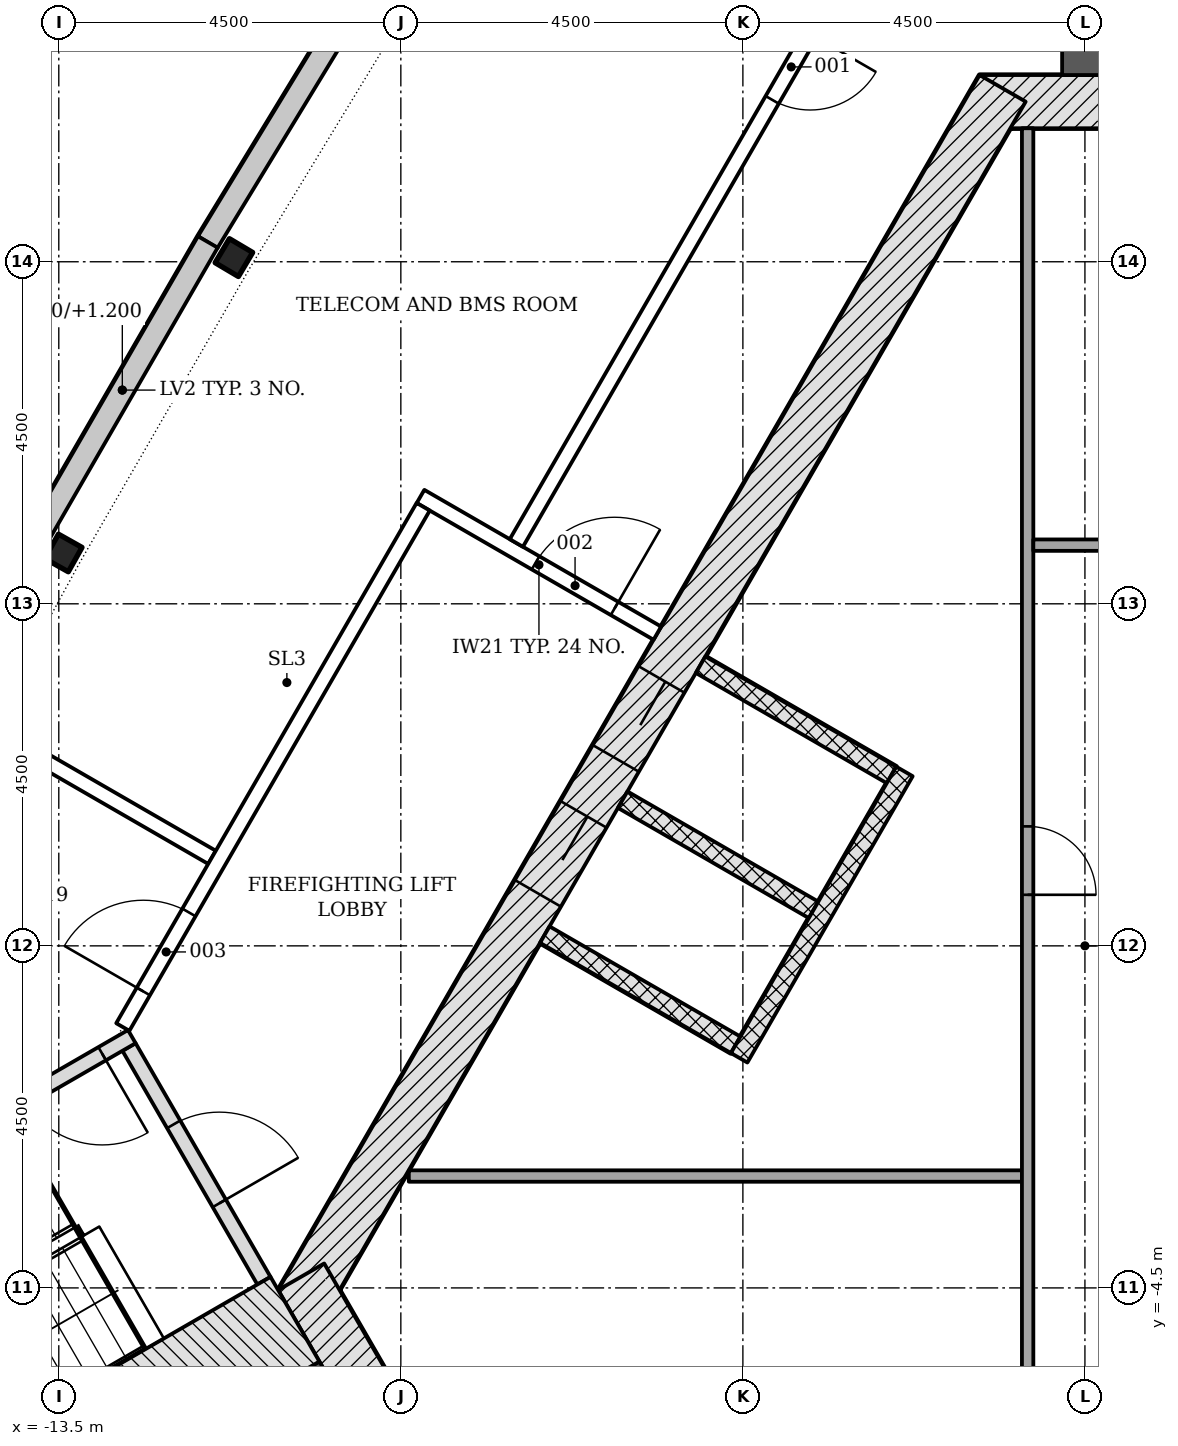
"""IFC4 building model, lengths in metres.
Left out: names, types, materials, properties, quantities, classifications, styles, units other than length and angle.
Written with IfcOpenShell. Run it as: python <this file> out.ifc"""

import sys

from ifc_helpers import new_model, si_unit, direction, frame, frame_2d, origin, origin_2d, place, context, subcontext, project, spatial, polyline, rectangle, i_section, outline, extrude, element, fill, save


model = new_model("IFC4")
c1 = context("Model", 3, precision=1e-05, world=origin(), true_north=direction((0.0, 1.0)))
c2 = subcontext(c1, "Body", "Model", "MODEL_VIEW")
j1 = project(units=[si_unit("LENGTHUNIT", "METRE"), si_unit("PLANEANGLEUNIT", "RADIAN")], contexts=[c1])
p1 = place(None, origin())
s1 = spatial("IfcSite", under=j1, at=p1, CompositionType="ELEMENT")
p2 = place(p1, origin())
s2 = spatial("IfcBuilding", under=s1, at=p2, CompositionType="ELEMENT")
p3 = place(p2, frame((0.0, 0.0, 293.1)))
s3 = spatial("IfcBuildingStorey", under=s2, at=p3, CompositionType="ELEMENT", Elevation=293.1)
p4 = place(p3, frame((1.386, 11.106, -0.25), z_axis=(0.0, 0.0, 1.0), x_axis=(-1.0, 0.0, 0.0)))
e1 = element("IfcWall", 1, at=p4, inside=s3, PredefinedType="SHEAR", context=c2, shape_type="SweptSolid", body=[
    extrude(rectangle(XDim=2.771, YDim=0.7, at=frame_2d((1.386, 0.0))), origin(), (0.0, 0.0, 1.0), 4.5),
])
p5 = place(p3, frame((-1.083, 11.281, -0.25), z_axis=(0.0, 0.0, 1.0), x_axis=(-0.500001446645, -0.866024568562, 0.0)))
e2 = element("IfcWall", 2, at=p5, inside=s3, PredefinedType="SHEAR", context=c2, shape_type="SweptSolid", body=[
    extrude(rectangle(XDim=18.458, YDim=0.7, at=frame_2d((9.229, 0.0))), origin(), (0.0, 0.0, 1.0), 4.5),
])
p6 = place(p5, frame((8.979, 0.0, 0.25)))
e3 = element("IfcOpeningElement", 3, at=p6, cuts=e2, PredefinedType="OPENING", context=c2, shape_type="SweptSolid", body=[
    extrude(rectangle(XDim=1.2, YDim=2.1, at=frame_2d((0.6, 1.05))), frame((0.0, 0.36, 0.0), z_axis=(0.0, -1.0, 0.0), x_axis=(1.0, 0.0, 0.0)), (0.0, 0.0, 1.0), 0.72),
])
p7 = place(p5, frame((11.029, 0.0, 0.25)))
e4 = element("IfcOpeningElement", 4, at=p7, cuts=e2, PredefinedType="OPENING", context=c2, shape_type="SweptSolid", body=[
    extrude(rectangle(XDim=1.2, YDim=2.1, at=frame_2d((0.6, 1.05))), frame((0.0, 0.36, 0.0), z_axis=(0.0, -1.0, 0.0), x_axis=(1.0, 0.0, 0.0)), (0.0, 0.0, 1.0), 0.72),
])
p8 = place(p3, frame((-10.311, -4.353, -0.25), z_axis=(0.0, 0.0, 1.0), x_axis=(0.500042739161, -0.866000726912, 0.0)))
e5 = element("IfcWall", 5, at=p8, inside=s3, PredefinedType="SHEAR", context=c2, shape_type="SweptSolid", body=[
    extrude(rectangle(XDim=2.771, YDim=0.7, at=frame_2d((1.386, 0.0))), origin(), (0.0, 0.0, 1.0), 4.5),
])
p9 = place(p3, frame((0.0, 11.456, -0.25), z_axis=(0.0, 0.0, 1.0), x_axis=(0.0, 1.0, 0.0)))
e6 = element("IfcWall", 6, at=p9, inside=s3, PredefinedType="SHEAR", context=c2, shape_type="SweptSolid", body=[
    extrude(rectangle(XDim=6.679, YDim=0.6, at=frame_2d((3.339, 0.0))), origin(), (0.0, 0.0, 1.0), 4.5),
])
p10 = place(p3, frame((-9.922, -5.728, -0.25), z_axis=(0.0, 0.0, 1.0), x_axis=(-0.866032176823, -0.499988268569, 0.0)))
e7 = element("IfcWall", 7, at=p10, inside=s3, PredefinedType="SHEAR", context=c2, shape_type="SweptSolid", body=[
    extrude(rectangle(XDim=6.678, YDim=0.6, at=frame_2d((3.339, 0.0))), origin(), (0.0, 0.0, 1.0), 4.5),
])
for number, where, z_axis, x_axis in (
    (8, (-11.196, 9.055, -0.25), (0.0, 0.0, 1.0), (-0.51, -0.86, 0.0)),
    (9, (-13.44, 5.169, -0.25), (0.0, 0.0, 1.0), (-0.49, -0.872, 0.0)),
):
    element("IfcColumn", number, at=place(p3, frame(where, z_axis=z_axis, x_axis=x_axis)), inside=s3, PredefinedType="COLUMN", context=c2, shape_type="SweptSolid", body=[
        extrude(i_section(OverallWidth=0.368, OverallDepth=0.356, WebThickness=0.011, FlangeThickness=0.018, FilletRadius=0.015, at=origin_2d()), origin(), (0.0, 0.0, 1.0), 4.5),
    ])
p11 = place(p3, origin())
e10 = element("IfcWall", 10, at=p11, inside=s3, PredefinedType="NOTDEFINED", context=c2, shape_type="SweptSolid", body=[
    extrude(outline(polyline([(-6.901, 16.968), (-9.33, 13.179), (-11.669, 9.335), (-11.413, 9.179), (-9.075, 13.02), (-6.649, 16.806), (-6.901, 16.968)])), origin(), (0.0, 0.0, 1.0), 4.25),
])
p12 = place(p3, origin())
e11 = element("IfcWall", 11, at=p12, inside=s3, PredefinedType="NOTDEFINED", context=c2, shape_type="SweptSolid", body=[
    extrude(outline(polyline([(-11.669, 9.335), (-13.919, 5.438), (-13.659, 5.288), (-11.409, 9.185), (-11.669, 9.335)])), origin(), (0.0, 0.0, 1.0), 1.2),
])
p13 = place(p3, origin())
e12 = element("IfcWall", 12, at=p13, inside=s3, PredefinedType="NOTDEFINED", context=c2, shape_type="SweptSolid", body=[
    extrude(outline(polyline([(-18.145, -2.507), (-19.021, -4.273), (-19.538, -5.703), (-19.733, -7.21), (-19.599, -8.724), (-19.141, -10.174), (-18.381, -11.49), (-17.355, -12.611), (-16.111, -13.485), (-14.708, -14.069), (-13.211, -14.336), (-11.244, -14.46), (-11.225, -14.161), (-13.176, -14.038), (-14.623, -13.779), (-15.965, -13.22), (-17.156, -12.385), (-18.138, -11.312), (-18.865, -10.052), (-19.303, -8.665), (-19.432, -7.216), (-19.244, -5.774), (-18.745, -4.391), (-17.876, -2.64), (-18.145, -2.507)])), origin(), (0.0, 0.0, 1.0), 4.25),
])
for number, where, z_axis, x_axis in (
    (13, (-5.056, 3.699, -0.25), (0.0, 0.0, 1.0), (0.866, -0.5, 0.0)),
    (14, (-6.081, 1.923, -0.25), (0.0, 0.0, 1.0), (0.866, -0.5, 0.0)),
    (15, (-7.106, 0.148, -0.25), (0.0, 0.0, 1.0), (0.866, -0.5, 0.0)),
):
    element("IfcWall", number, at=place(p3, frame(where, z_axis=z_axis, x_axis=x_axis)), inside=s3, PredefinedType="PARTITIONING", context=c2, shape_type="SweptSolid", body=[
        extrude(rectangle(XDim=2.9, YDim=0.25, at=frame_2d((1.45, 0.0))), origin(), (0.0, 0.0, 1.0), 4.5),
    ])
p14 = place(p3, frame((-2.374, 2.294, 0.0), z_axis=(0.0, 0.0, 1.0), x_axis=(-0.499996127374, -0.866027639635, 0.0)))
e16 = element("IfcWall", 16, at=p14, inside=s3, PredefinedType="PARTITIONING", context=c2, shape_type="SweptSolid", body=[
    extrude(rectangle(XDim=4.35, YDim=0.25, at=frame_2d((2.175, 0.0))), origin(), (0.0, 0.0, 1.0), 4.25),
])
p15 = place(p3, frame((-8.895, -3.028, 0.0), z_axis=(0.0, 0.0, 1.0), x_axis=(1.0, 0.0, 0.0)))
e17 = element("IfcWall", 17, at=p15, inside=s3, PredefinedType="PARTITIONING", context=c2, shape_type="SweptSolid", body=[
    extrude(rectangle(XDim=8.066, YDim=0.15, at=frame_2d((4.033, 0.0))), origin(), (0.0, 0.0, 1.0), 4.25),
])
p16 = place(p3, frame((-0.754, 10.756, 0.0), z_axis=(0.0, 0.0, 1.0), x_axis=(0.0, -1.0, 0.0)))
e18 = element("IfcWall", 18, at=p16, inside=s3, PredefinedType="PARTITIONING", context=c2, shape_type="SweptSolid", body=[
    extrude(rectangle(XDim=16.985, YDim=0.15, at=frame_2d((8.492, 0.0))), origin(), (0.0, 0.0, 1.0), 4.25),
])
p17 = place(p16, frame((9.185, 0.0, 0.0)))
e19 = element("IfcOpeningElement", 19, at=p17, cuts=e18, PredefinedType="OPENING", context=c2, shape_type="SweptSolid", body=[
    extrude(rectangle(XDim=0.9, YDim=2.1, at=frame_2d((0.45, 1.05))), frame((0.0, 0.085, 0.0), z_axis=(0.0, -1.0, 0.0), x_axis=(1.0, 0.0, 0.0)), (0.0, 0.0, 1.0), 0.17),
])
p18 = place(p3, frame((-0.679, 5.272, 0.0), z_axis=(0.0, 0.0, 1.0), x_axis=(1.0, 0.0, 0.0)))
e20 = element("IfcWall", 20, at=p18, inside=s3, PredefinedType="PARTITIONING", context=c2, shape_type="SweptSolid", body=[
    extrude(rectangle(XDim=1.375, YDim=0.15, at=frame_2d((0.688, 0.0))), origin(), (0.0, 0.0, 1.0), 4.25),
])
p19 = place(p3, frame((-12.576, -1.331, -0.25), z_axis=(0.0, 0.0, 1.0), x_axis=(0.499970499736, -0.8660424351, 0.0)))
e21 = element("IfcWall", 21, at=p19, inside=s3, PredefinedType="SHEAR", context=c2, shape_type="SweptSolid", body=[
    extrude(rectangle(XDim=3.55, YDim=0.2, at=frame_2d((1.775, 0.0))), origin(), (0.0, 0.0, 1.0), 4.5),
])
p20 = place(p19, frame((1.175, 0.0, 0.25)))
e22 = element("IfcOpeningElement", 22, at=p20, cuts=e21, PredefinedType="OPENING", context=c2, shape_type="SweptSolid", body=[
    extrude(rectangle(XDim=1.2, YDim=2.1, at=frame_2d((0.6, 1.05))), frame((0.0, 0.11, 0.0), z_axis=(0.0, -1.0, 0.0), x_axis=(1.0, 0.0, 0.0)), (0.0, 0.0, 1.0), 0.22),
])
p21 = place(p3, frame((-12.539, -1.194, -0.25), z_axis=(0.0, 0.0, 1.0), x_axis=(-0.866045472092, -0.499965239061, 0.0)))
e23 = element("IfcWall", 23, at=p21, inside=s3, PredefinedType="SHEAR", context=c2, shape_type="SweptSolid", body=[
    extrude(rectangle(XDim=5.6, YDim=0.2, at=frame_2d((2.8, 0.0))), origin(), (0.0, 0.0, 1.0), 4.5),
])
p22 = place(p21, frame((0.45, 0.0, 0.25)))
e24 = element("IfcOpeningElement", 24, at=p22, cuts=e23, PredefinedType="OPENING", context=c2, shape_type="SweptSolid", body=[
    extrude(rectangle(XDim=1.2, YDim=2.1, at=frame_2d((0.6, 1.05))), frame((0.0, 0.11, 0.0), z_axis=(0.0, -1.0, 0.0), x_axis=(1.0, 0.0, 0.0)), (0.0, 0.0, 1.0), 0.22),
])
p23 = place(p3, frame((-10.393, -4.912, -0.25), z_axis=(0.0, 0.0, 1.0), x_axis=(-0.866025486527, -0.499999856685, 0.0)))
e25 = element("IfcWall", 25, at=p23, inside=s3, PredefinedType="SHEAR", context=c2, shape_type="SweptSolid", body=[
    extrude(rectangle(XDim=6.679, YDim=1.286, at=frame_2d((3.339, 0.0))), origin(), (0.0, 0.0, 1.0), 4.5),
])
p24 = place(p3, frame((-8.741, 5.913, 0.0), z_axis=(0.0, 0.0, 1.0), x_axis=(0.866017220491, -0.500014173611, 0.0)))
e26 = element("IfcWall", 26, at=p24, inside=s3, PredefinedType="PARTITIONING", context=c2, shape_type="SweptSolid", body=[
    extrude(rectangle(XDim=3.598, YDim=0.2, at=frame_2d((1.799, 0.0))), origin(), (0.0, 0.0, 1.0), 4.25),
])
p25 = place(p24, frame((1.748, 0.0, 0.0)))
e27 = element("IfcOpeningElement", 27, at=p25, cuts=e26, PredefinedType="OPENING", context=c2, shape_type="SweptSolid", body=[
    extrude(rectangle(XDim=1.2, YDim=2.1, at=frame_2d((0.6, 1.05))), frame((0.0, 0.11, 0.0), z_axis=(0.0, -1.0, 0.0), x_axis=(1.0, 0.0, 0.0)), (0.0, 0.0, 1.0), 0.22),
])
p26 = place(p3, frame((-14.013, 2.625, 0.0), z_axis=(0.0, 0.0, 1.0), x_axis=(0.866026830048, -0.499997529631, 0.0)))
e28 = element("IfcWall", 28, at=p26, inside=s3, PredefinedType="PARTITIONING", context=c2, shape_type="SweptSolid", body=[
    extrude(rectangle(XDim=2.919, YDim=0.2, at=frame_2d((1.46, 0.0))), origin(), (0.0, 0.0, 1.0), 4.25),
])
p27 = place(p3, frame((-12.658, -1.068, 0.0), z_axis=(0.0, 0.0, 1.0), x_axis=(0.499996073327, 0.866027670838, 0.0)))
e29 = element("IfcWall", 29, at=p27, inside=s3, PredefinedType="PARTITIONING", context=c2, shape_type="SweptSolid", body=[
    extrude(rectangle(XDim=7.904, YDim=0.2, at=frame_2d((3.952, 0.0))), origin(), (0.0, 0.0, 1.0), 3.702),
])
p28 = place(p27, frame((0.541, 0.0, 0.0)))
e30 = element("IfcOpeningElement", 30, at=p28, cuts=e29, PredefinedType="OPENING", context=c2, shape_type="SweptSolid", body=[
    extrude(rectangle(XDim=1.2, YDim=2.1, at=frame_2d((0.6, 1.05))), frame((0.0, 0.11, 0.0), z_axis=(0.0, -1.0, 0.0), x_axis=(1.0, 0.0, 0.0)), (0.0, 0.0, 1.0), 0.22),
])
p29 = place(p3, frame((-0.387, 17.587, 0.0), z_axis=(0.0, 0.0, 1.0), x_axis=(-0.499990582914, -0.866030840673, 0.0)))
e31 = element("IfcWall", 31, at=p29, inside=s3, PredefinedType="PARTITIONING", context=c2, shape_type="SweptSolid", body=[
    extrude(rectangle(XDim=14.187, YDim=0.2, at=frame_2d((7.094, 0.0))), origin(), (0.0, 0.0, 1.0), 3.702),
])
p30 = place(p29, frame((6.455, 0.0, 0.0)))
e32 = element("IfcOpeningElement", 32, at=p30, cuts=e31, PredefinedType="OPENING", context=c2, shape_type="SweptSolid", body=[
    extrude(rectangle(XDim=1.0, YDim=2.1, at=frame_2d((0.5, 1.05))), frame((0.0, 0.11, 0.0), z_axis=(0.0, -1.0, 0.0), x_axis=(1.0, 0.0, 0.0)), (0.0, 0.0, 1.0), 0.22),
])
p31 = place(p6, origin())
e33 = element("IfcDoor", 33, at=p31, inside=s3, OperationType="DOUBLE_DOOR_SLIDING", PredefinedType="DOOR", context=c2, shape_type="SweptSolid", body=[
    extrude(rectangle(XDim=1.2, YDim=2.1, at=frame_2d((0.6, 1.05))), frame((0.0, 0.025, 0.0), z_axis=(0.0, -1.0, 0.0), x_axis=(1.0, 0.0, 0.0)), (0.0, 0.0, 1.0), 0.05),
])
fill(e3, e33)
p32 = place(p7, origin())
e34 = element("IfcDoor", 34, at=p32, inside=s3, OperationType="DOUBLE_DOOR_SLIDING", PredefinedType="DOOR", context=c2, shape_type="SweptSolid", body=[
    extrude(rectangle(XDim=1.2, YDim=2.1, at=frame_2d((0.6, 1.05))), frame((0.0, 0.025, 0.0), z_axis=(0.0, -1.0, 0.0), x_axis=(1.0, 0.0, 0.0)), (0.0, 0.0, 1.0), 0.05),
])
fill(e4, e34)
p33 = place(p17, origin())
e35 = element("IfcDoor", 35, at=p33, inside=s3, OperationType="SINGLE_SWING_RIGHT", PredefinedType="DOOR", context=c2, shape_type="SweptSolid", body=[
    extrude(rectangle(XDim=0.9, YDim=2.1, at=frame_2d((0.45, 1.05))), frame((0.0, 0.025, 0.0), z_axis=(0.0, -1.0, 0.0), x_axis=(1.0, 0.0, 0.0)), (0.0, 0.0, 1.0), 0.05),
])
fill(e19, e35)
p34 = place(p20, origin())
e36 = element("IfcDoor", 36, at=p34, inside=s3, OperationType="SINGLE_SWING_RIGHT", PredefinedType="DOOR", context=c2, shape_type="SweptSolid", body=[
    extrude(rectangle(XDim=1.2, YDim=2.1, at=frame_2d((0.6, 1.05))), frame((0.0, 0.025, 0.0), z_axis=(0.0, -1.0, 0.0), x_axis=(1.0, 0.0, 0.0)), (0.0, 0.0, 1.0), 0.05),
])
fill(e22, e36)
p35 = place(p22, origin())
e37 = element("IfcDoor", 37, at=p35, inside=s3, OperationType="SINGLE_SWING_LEFT", PredefinedType="DOOR", context=c2, shape_type="SweptSolid", body=[
    extrude(rectangle(XDim=1.2, YDim=2.1, at=frame_2d((0.6, 1.05))), frame((0.0, 0.025, 0.0), z_axis=(0.0, -1.0, 0.0), x_axis=(1.0, 0.0, 0.0)), (0.0, 0.0, 1.0), 0.05),
])
fill(e24, e37)
p36 = place(p30, origin())
e38 = element("IfcDoor", 38, at=p36, inside=s3, OperationType="SINGLE_SWING_LEFT", PredefinedType="DOOR", context=c2, shape_type="SweptSolid", body=[
    extrude(rectangle(XDim=1.0, YDim=2.1, at=frame_2d((0.5, 1.05))), frame((0.0, 0.025, 0.0), z_axis=(0.0, -1.0, 0.0), x_axis=(1.0, 0.0, 0.0)), (0.0, 0.0, 1.0), 0.05),
])
fill(e32, e38)
p37 = place(p25, origin())
e39 = element("IfcDoor", 39, at=p37, inside=s3, OperationType="SINGLE_SWING_RIGHT", PredefinedType="DOOR", context=c2, shape_type="SweptSolid", body=[
    extrude(rectangle(XDim=1.2, YDim=2.1, at=frame_2d((0.6, 1.05))), frame((0.0, 0.025, 0.0), z_axis=(0.0, -1.0, 0.0), x_axis=(1.0, 0.0, 0.0)), (0.0, 0.0, 1.0), 0.05),
])
fill(e27, e39)
p38 = place(p28, origin())
e40 = element("IfcDoor", 40, at=p38, inside=s3, OperationType="SINGLE_SWING_LEFT", PredefinedType="DOOR", context=c2, shape_type="SweptSolid", body=[
    extrude(rectangle(XDim=1.2, YDim=2.1, at=frame_2d((0.6, 1.05))), frame((0.0, 0.025, 0.0), z_axis=(0.0, -1.0, 0.0), x_axis=(1.0, 0.0, 0.0)), (0.0, 0.0, 1.0), 0.05),
])
fill(e30, e40)
save(model, sys.argv[1])
